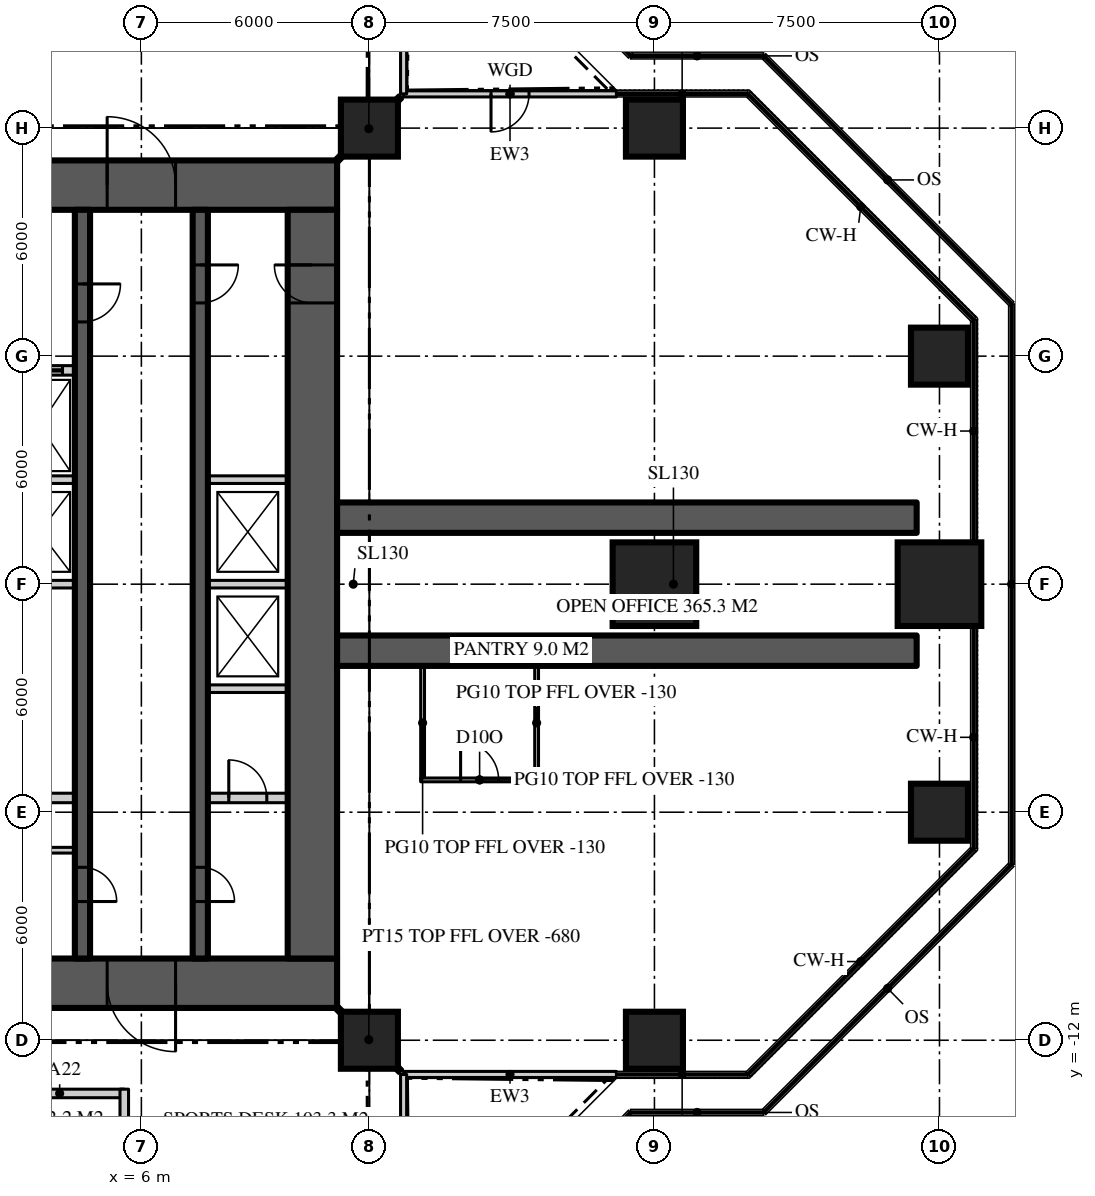
"""IFC4 building model, lengths in metres.
Left out: names, types, materials, properties, quantities, classifications, styles, units other than length and angle.
Written with IfcOpenShell. Run it as: python <this file> out.ifc"""

import sys

from ifc_helpers import new_model, si_unit, direction, frame, frame_2d, origin, origin_2d, place, context, subcontext, project, spatial, rectangle, extrude, element, fill, save


model = new_model("IFC4")
c1 = context("Model", 3, precision=1e-05, world=origin(), true_north=direction((0.0, 1.0)))
c2 = subcontext(c1, "Body", "Model", "MODEL_VIEW")
j1 = project(units=[si_unit("LENGTHUNIT", "METRE"), si_unit("PLANEANGLEUNIT", "RADIAN")], contexts=[c1])
p1 = place(None, origin())
s1 = spatial("IfcSite", under=j1, at=p1, CompositionType="ELEMENT")
p2 = place(p1, origin())
s2 = spatial("IfcBuilding", under=s1, at=p2, CompositionType="ELEMENT")
p3 = place(p2, frame((0.0, 0.0, 224.4)))
s3 = spatial("IfcBuildingStorey", under=s2, at=p3, CompositionType="ELEMENT", Elevation=224.4)
p4 = place(p3, frame((-11.15, 10.5, 0.0), z_axis=(0.0, 0.0, 1.0), x_axis=(1.0, 0.0, 0.0)))
e1 = element("IfcWall", 1, at=p4, inside=s3, PredefinedType="SHEAR", context=c2, shape_type="SweptSolid", body=[
    extrude(rectangle(XDim=22.3, YDim=1.3, at=frame_2d((11.15, 0.0))), origin(), (0.0, 0.0, 1.0), 3.9),
])
p5 = place(p4, frame((4.25, 0.0, 0.0)))
e2 = element("IfcOpeningElement", 2, at=p5, cuts=e1, PredefinedType="OPENING", context=c2, shape_type="SweptSolid", body=[
    extrude(rectangle(XDim=1.8, YDim=2.2, at=frame_2d((0.9, 1.1))), frame((0.0, 0.66, 0.0), z_axis=(0.0, -1.0, 0.0), x_axis=(1.0, 0.0, 0.0)), (0.0, 0.0, 1.0), 1.32),
])
p6 = place(p4, frame((16.25, 0.0, 0.0)))
e3 = element("IfcOpeningElement", 3, at=p6, cuts=e1, PredefinedType="OPENING", context=c2, shape_type="SweptSolid", body=[
    extrude(rectangle(XDim=1.8, YDim=2.2, at=frame_2d((0.9, 1.1))), frame((0.0, 0.66, 0.0), z_axis=(0.0, -1.0, 0.0), x_axis=(1.0, 0.0, 0.0)), (0.0, 0.0, 1.0), 1.32),
])
p7 = place(p3, frame((11.15, -10.5, 0.0), z_axis=(0.0, 0.0, 1.0), x_axis=(-1.0, 0.0, 0.0)))
e4 = element("IfcWall", 4, at=p7, inside=s3, PredefinedType="SHEAR", context=c2, shape_type="SweptSolid", body=[
    extrude(rectangle(XDim=22.3, YDim=1.3, at=frame_2d((11.15, 0.0))), origin(), (0.0, 0.0, 1.0), 3.9),
])
p8 = place(p7, frame((16.25, 0.0, 0.0)))
e5 = element("IfcOpeningElement", 5, at=p8, cuts=e4, PredefinedType="OPENING", context=c2, shape_type="SweptSolid", body=[
    extrude(rectangle(XDim=1.8, YDim=2.2, at=frame_2d((0.9, 1.1))), frame((0.0, 0.66, 0.0), z_axis=(0.0, -1.0, 0.0), x_axis=(1.0, 0.0, 0.0)), (0.0, 0.0, 1.0), 1.32),
])
p9 = place(p7, frame((4.25, 0.0, 0.0)))
e6 = element("IfcOpeningElement", 6, at=p9, cuts=e4, PredefinedType="OPENING", context=c2, shape_type="SweptSolid", body=[
    extrude(rectangle(XDim=1.8, YDim=2.2, at=frame_2d((0.9, 1.1))), frame((0.0, 0.66, 0.0), z_axis=(0.0, -1.0, 0.0), x_axis=(1.0, 0.0, 0.0)), (0.0, 0.0, 1.0), 1.32),
])
p10 = place(p3, frame((10.5, -9.85, 0.0), z_axis=(0.0, 0.0, 1.0), x_axis=(0.0, 1.0, 0.0)))
e7 = element("IfcWall", 7, at=p10, inside=s3, PredefinedType="SHEAR", context=c2, shape_type="SweptSolid", body=[
    extrude(rectangle(XDim=19.7, YDim=1.3, at=frame_2d((9.85, 0.0))), origin(), (0.0, 0.0, 1.0), 3.9),
])
p11 = place(p10, frame((17.25, 0.0, 0.0)))
e8 = element("IfcOpeningElement", 8, at=p11, cuts=e7, PredefinedType="OPENING", context=c2, shape_type="SweptSolid", body=[
    extrude(rectangle(XDim=1.0, YDim=2.2, at=frame_2d((0.5, 1.1))), frame((0.0, 0.66, 0.0), z_axis=(0.0, -1.0, 0.0), x_axis=(1.0, 0.0, 0.0)), (0.0, 0.0, 1.0), 1.32),
])
for number, where, z_axis, x_axis in (
    (9, (11.15, -1.75, 0.0), (0.0, 0.0, 1.0), (1.0, 0.0, 0.0)),
    (10, (11.15, 1.75, 0.0), (0.0, 0.0, 1.0), (1.0, 0.0, 0.0)),
):
    element("IfcWall", number, at=place(p3, frame(where, z_axis=z_axis, x_axis=x_axis)), inside=s3, PredefinedType="SHEAR", context=c2, shape_type="SweptSolid", body=[
        extrude(rectangle(XDim=15.25, YDim=0.8, at=frame_2d((7.625, 0.0))), origin(), (0.0, 0.0, 1.0), 3.9),
    ])
for number, where, z_axis, x_axis in (
    (11, (12.0, -12.0, 0.0), (0.0, 0.0, 1.0), (1.0, 0.0, 0.0)),
    (12, (19.5, -12.0, 0.0), (0.0, 0.0, 1.0), (1.0, 0.0, 0.0)),
    (13, (27.0, -6.0, 0.0), (0.0, 0.0, 1.0), (1.0, 0.0, 0.0)),
):
    element("IfcColumn", number, at=place(p3, frame(where, z_axis=z_axis, x_axis=x_axis)), inside=s3, PredefinedType="COLUMN", context=c2, shape_type="SweptSolid", body=[
        extrude(rectangle(XDim=1.5, YDim=1.5, at=origin_2d()), origin(), (0.0, 0.0, 1.0), 3.9),
    ])
for number, where, z_axis, x_axis in (
    (14, (19.5, 0.0, 0.0), (0.0, 0.0, 1.0), (1.0, 0.0, 0.0)),
    (15, (27.0, 0.0, 0.0), (0.0, 0.0, 1.0), (1.0, 0.0, 0.0)),
):
    element("IfcColumn", number, at=place(p3, frame(where, z_axis=z_axis, x_axis=x_axis)), inside=s3, PredefinedType="COLUMN", context=c2, shape_type="SweptSolid", body=[
        extrude(rectangle(XDim=2.2, YDim=2.2, at=origin_2d()), origin(), (0.0, 0.0, 1.0), 3.9),
    ])
for number, where, z_axis, x_axis in (
    (16, (27.0, 6.0, 0.0), (0.0, 0.0, 1.0), (1.0, 0.0, 0.0)),
    (17, (12.0, 12.0, 0.0), (0.0, 0.0, 1.0), (1.0, 0.0, 0.0)),
    (18, (19.5, 12.0, 0.0), (0.0, 0.0, 1.0), (1.0, 0.0, 0.0)),
):
    element("IfcColumn", number, at=place(p3, frame(where, z_axis=z_axis, x_axis=x_axis)), inside=s3, PredefinedType="COLUMN", context=c2, shape_type="SweptSolid", body=[
        extrude(rectangle(XDim=1.5, YDim=1.5, at=origin_2d()), origin(), (0.0, 0.0, 1.0), 3.9),
    ])
p12 = place(p3, frame((12.9, -12.9, 0.0), z_axis=(0.0, 0.0, 1.0), x_axis=(1.0, 0.0, 0.0)))
e19 = element("IfcWall", 19, at=p12, inside=s3, PredefinedType="SOLIDWALL", context=c2, shape_type="SweptSolid", body=[
    extrude(rectangle(XDim=5.6, YDim=0.16, at=frame_2d((2.8, 0.0))), origin(), (0.0, 0.0, 1.0), 3.77),
])
p13 = place(p3, frame((18.5, 12.9, 0.0), z_axis=(0.0, 0.0, 1.0), x_axis=(-1.0, 0.0, 0.0)))
e20 = element("IfcWall", 20, at=p13, inside=s3, PredefinedType="SOLIDWALL", context=c2, shape_type="SweptSolid", body=[
    extrude(rectangle(XDim=5.6, YDim=0.16, at=frame_2d((2.8, 0.0))), origin(), (0.0, 0.0, 1.0), 3.77),
])
p14 = place(p13, frame((2.3, 0.0, 0.0)))
e21 = element("IfcOpeningElement", 21, at=p14, cuts=e20, PredefinedType="OPENING", context=c2, shape_type="SweptSolid", body=[
    extrude(rectangle(XDim=1.0, YDim=2.2, at=frame_2d((0.5, 1.1))), frame((0.0, 0.09, 0.0), z_axis=(0.0, -1.0, 0.0), x_axis=(1.0, 0.0, 0.0)), (0.0, 0.0, 1.0), 0.18),
])
p15 = place(p3, frame((12.9, 12.9, 0.0), z_axis=(0.0, 0.0, 1.0), x_axis=(0.0, 1.0, 0.0)))
e22 = element("IfcWall", 22, at=p15, inside=s3, PredefinedType="SOLIDWALL", context=c2, shape_type="SweptSolid", body=[
    extrude(rectangle(XDim=5.6, YDim=0.16, at=frame_2d((2.8, 0.0))), origin(), (0.0, 0.0, 1.0), 3.77),
])
p16 = place(p3, frame((12.9, -18.5, 0.0), z_axis=(0.0, 0.0, 1.0), x_axis=(0.0, 1.0, 0.0)))
e23 = element("IfcWall", 23, at=p16, inside=s3, PredefinedType="SOLIDWALL", context=c2, shape_type="SweptSolid", body=[
    extrude(rectangle(XDim=5.6, YDim=0.16, at=frame_2d((2.8, 0.0))), origin(), (0.0, 0.0, 1.0), 3.77),
])
p17 = place(p16, frame((2.3, 0.0, 0.0)))
e24 = element("IfcOpeningElement", 24, at=p17, cuts=e23, PredefinedType="OPENING", context=c2, shape_type="SweptSolid", body=[
    extrude(rectangle(XDim=1.0, YDim=2.2, at=frame_2d((0.5, 1.1))), frame((0.0, 0.09, 0.0), z_axis=(0.0, -1.0, 0.0), x_axis=(1.0, 0.0, 0.0)), (0.0, 0.0, 1.0), 0.18),
])
p18 = place(p3, frame((7.55, 9.85, 0.0), z_axis=(0.0, 0.0, 1.0), x_axis=(0.0, -1.0, 0.0)))
e25 = element("IfcWall", 25, at=p18, inside=s3, PredefinedType="SHEAR", context=c2, shape_type="SweptSolid", body=[
    extrude(rectangle(XDim=19.7, YDim=0.4, at=frame_2d((9.85, 0.0))), origin(), (0.0, 0.0, 1.0), 3.9),
])
p19 = place(p18, frame((1.45, 0.0, 0.0)))
e26 = element("IfcOpeningElement", 26, at=p19, cuts=e25, PredefinedType="OPENING", context=c2, shape_type="SweptSolid", body=[
    extrude(rectangle(XDim=1.0, YDim=2.2, at=frame_2d((0.5, 1.1))), frame((0.0, 0.21, 0.0), z_axis=(0.0, -1.0, 0.0), x_axis=(1.0, 0.0, 0.0)), (0.0, 0.0, 1.0), 0.42),
])
p20 = place(p18, frame((17.3, 0.0, 0.0)))
e27 = element("IfcOpeningElement", 27, at=p20, cuts=e25, PredefinedType="OPENING", context=c2, shape_type="SweptSolid", body=[
    extrude(rectangle(XDim=0.9, YDim=2.1, at=frame_2d((0.45, 1.05))), frame((0.0, 0.21, 0.0), z_axis=(0.0, -1.0, 0.0), x_axis=(1.0, 0.0, 0.0)), (0.0, 0.0, 1.0), 0.42),
])
p21 = place(p3, frame((4.45, 9.85, 0.0), z_axis=(0.0, 0.0, 1.0), x_axis=(0.0, -1.0, 0.0)))
e28 = element("IfcWall", 28, at=p21, inside=s3, PredefinedType="SHEAR", context=c2, shape_type="SweptSolid", body=[
    extrude(rectangle(XDim=19.7, YDim=0.4, at=frame_2d((9.85, 0.0))), origin(), (0.0, 0.0, 1.0), 3.9),
])
p22 = place(p21, frame((1.95, 0.0, 0.0)))
e29 = element("IfcOpeningElement", 29, at=p22, cuts=e28, PredefinedType="OPENING", context=c2, shape_type="SweptSolid", body=[
    extrude(rectangle(XDim=1.0, YDim=2.2, at=frame_2d((0.5, 1.1))), frame((0.0, 0.21, 0.0), z_axis=(0.0, -1.0, 0.0), x_axis=(1.0, 0.0, 0.0)), (0.0, 0.0, 1.0), 0.42),
])
p23 = place(p21, frame((17.3, 0.0, 0.0)))
e30 = element("IfcOpeningElement", 30, at=p23, cuts=e28, PredefinedType="OPENING", context=c2, shape_type="SweptSolid", body=[
    extrude(rectangle(XDim=0.9, YDim=2.1, at=frame_2d((0.45, 1.05))), frame((0.0, 0.21, 0.0), z_axis=(0.0, -1.0, 0.0), x_axis=(1.0, 0.0, 0.0)), (0.0, 0.0, 1.0), 0.42),
])
p24 = place(p3, frame((2.4, 5.625, 0.0), z_axis=(0.0, 0.0, 1.0), x_axis=(1.0, 0.0, 0.0)))
e31 = element("IfcWall", 31, at=p24, inside=s3, PredefinedType="SOLIDWALL", context=c2, shape_type="SweptSolid", body=[
    extrude(rectangle(XDim=1.85, YDim=0.25, at=frame_2d((0.925, 0.0))), origin(), (0.0, 0.0, 1.0), 3.7),
])
p25 = place(p24, frame((0.325, 0.0, 0.0)))
e32 = element("IfcOpeningElement", 32, at=p25, cuts=e31, PredefinedType="OPENING", context=c2, shape_type="SweptSolid", body=[
    extrude(rectangle(XDim=1.2, YDim=2.2, at=frame_2d((0.6, 1.1))), frame((0.0, 0.135, 0.0), z_axis=(0.0, -1.0, 0.0), x_axis=(1.0, 0.0, 0.0)), (0.0, 0.0, 1.0), 0.27),
])
p26 = place(p3, frame((2.4, -5.625, 0.0), z_axis=(0.0, 0.0, 1.0), x_axis=(1.0, 0.0, 0.0)))
e33 = element("IfcWall", 33, at=p26, inside=s3, PredefinedType="SOLIDWALL", context=c2, shape_type="SweptSolid", body=[
    extrude(rectangle(XDim=1.85, YDim=0.25, at=frame_2d((0.925, 0.0))), origin(), (0.0, 0.0, 1.0), 3.7),
])
p27 = place(p3, frame((7.75, -5.625, 0.0), z_axis=(0.0, 0.0, 1.0), x_axis=(1.0, 0.0, 0.0)))
e34 = element("IfcWall", 34, at=p27, inside=s3, PredefinedType="SOLIDWALL", context=c2, shape_type="SweptSolid", body=[
    extrude(rectangle(XDim=2.1, YDim=0.25, at=frame_2d((1.05, 0.0))), origin(), (0.0, 0.0, 1.0), 3.7),
])
p28 = place(p27, frame((0.55, 0.0, 0.0)))
e35 = element("IfcOpeningElement", 35, at=p28, cuts=e34, PredefinedType="OPENING", context=c2, shape_type="SweptSolid", body=[
    extrude(rectangle(XDim=1.0, YDim=2.2, at=frame_2d((0.5, 1.1))), frame((0.0, 0.135, 0.0), z_axis=(0.0, -1.0, 0.0), x_axis=(1.0, 0.0, 0.0)), (0.0, 0.0, 1.0), 0.27),
])
p29 = place(p3, frame((7.75, -2.75, 0.0), z_axis=(0.0, 0.0, 1.0), x_axis=(1.0, 0.0, 0.0)))
e36 = element("IfcWall", 36, at=p29, inside=s3, PredefinedType="SOLIDWALL", context=c2, shape_type="SweptSolid", body=[
    extrude(rectangle(XDim=2.1, YDim=0.2, at=frame_2d((1.05, 0.0))), origin(), (0.0, 0.0, 1.0), 3.7),
])
p30 = place(p3, frame((2.4, 0.0, 0.0), z_axis=(0.0, 0.0, 1.0), x_axis=(1.0, 0.0, 0.0)))
e37 = element("IfcWall", 37, at=p30, inside=s3, PredefinedType="SOLIDWALL", context=c2, shape_type="SweptSolid", body=[
    extrude(rectangle(XDim=1.85, YDim=0.2, at=frame_2d((0.925, 0.0))), origin(), (0.0, 0.0, 1.0), 3.7),
])
p31 = place(p3, frame((7.75, 0.0, 0.0), z_axis=(0.0, 0.0, 1.0), x_axis=(1.0, 0.0, 0.0)))
e38 = element("IfcWall", 38, at=p31, inside=s3, PredefinedType="SOLIDWALL", context=c2, shape_type="SweptSolid", body=[
    extrude(rectangle(XDim=2.1, YDim=0.2, at=frame_2d((1.05, 0.0))), origin(), (0.0, 0.0, 1.0), 3.7),
])
p32 = place(p3, frame((2.4, 2.75, 0.0), z_axis=(0.0, 0.0, 1.0), x_axis=(1.0, 0.0, 0.0)))
e39 = element("IfcWall", 39, at=p32, inside=s3, PredefinedType="SOLIDWALL", context=c2, shape_type="SweptSolid", body=[
    extrude(rectangle(XDim=1.85, YDim=0.2, at=frame_2d((0.925, 0.0))), origin(), (0.0, 0.0, 1.0), 3.7),
])
p33 = place(p3, frame((7.75, 2.75, 0.0), z_axis=(0.0, 0.0, 1.0), x_axis=(1.0, 0.0, 0.0)))
e40 = element("IfcWall", 40, at=p33, inside=s3, PredefinedType="SOLIDWALL", context=c2, shape_type="SweptSolid", body=[
    extrude(rectangle(XDim=2.1, YDim=0.2, at=frame_2d((1.05, 0.0))), origin(), (0.0, 0.0, 1.0), 3.7),
])
for number, where, z_axis, x_axis in (
    (41, (13.4, -2.15, 0.0), (0.0, 0.0, 1.0), (0.0, -1.0, 0.0)),
    (42, (16.4, -2.15, 0.0), (0.0, 0.0, 1.0), (0.0, -1.0, 0.0)),
):
    element("IfcWall", number, at=place(p3, frame(where, z_axis=z_axis, x_axis=x_axis)), inside=s3, PredefinedType="PARTITIONING", context=c2, shape_type="SweptSolid", body=[
        extrude(rectangle(XDim=3.0, YDim=0.1, at=frame_2d((1.5, 0.0))), origin(), (0.0, 0.0, 1.0), 3.77),
    ])
p34 = place(p3, frame((13.35, -5.15, 0.0), z_axis=(0.0, 0.0, 1.0), x_axis=(1.0, 0.0, 0.0)))
e43 = element("IfcWall", 43, at=p34, inside=s3, PredefinedType="PARTITIONING", context=c2, shape_type="SweptSolid", body=[
    extrude(rectangle(XDim=3.1, YDim=0.1, at=frame_2d((1.55, 0.0))), origin(), (0.0, 0.0, 1.0), 3.77),
])
p35 = place(p34, frame((1.05, 0.0, 0.0)))
e44 = element("IfcOpeningElement", 44, at=p35, cuts=e43, PredefinedType="OPENING", context=c2, shape_type="SweptSolid", body=[
    extrude(rectangle(XDim=1.0, YDim=2.2, at=frame_2d((0.5, 1.1))), frame((0.0, 0.06, 0.0), z_axis=(0.0, -1.0, 0.0), x_axis=(1.0, 0.0, 0.0)), (0.0, 0.0, 1.0), 0.12),
])
p36 = place(p3, frame((2.15, -13.4, 0.0), z_axis=(0.0, 0.0, 1.0), x_axis=(1.0, 0.0, 0.0)))
e45 = element("IfcWall", 45, at=p36, inside=s3, PredefinedType="PARTITIONING", context=c2, shape_type="SweptSolid", body=[
    extrude(rectangle(XDim=3.4, YDim=0.225, at=frame_2d((1.7, 0.0))), origin(), (0.0, 0.0, 1.0), 3.77),
])
p37 = place(p3, frame((5.55, -13.288, 0.0), z_axis=(0.0, 0.0, 1.0), x_axis=(0.0, -1.0, 0.0)))
e46 = element("IfcWall", 46, at=p37, inside=s3, PredefinedType="PARTITIONING", context=c2, shape_type="SweptSolid", body=[
    extrude(rectangle(XDim=3.825, YDim=0.225, at=frame_2d((1.913, 0.0))), origin(), (0.0, 0.0, 1.0), 3.77),
])
p38 = place(p37, frame((1.312, 0.0, 0.0)))
e47 = element("IfcOpeningElement", 47, at=p38, cuts=e46, PredefinedType="OPENING", context=c2, shape_type="SweptSolid", body=[
    extrude(rectangle(XDim=1.2, YDim=2.2, at=frame_2d((0.6, 1.1))), frame((0.0, 0.123, 0.0), z_axis=(0.0, -1.0, 0.0), x_axis=(1.0, 0.0, 0.0)), (0.0, 0.0, 1.0), 0.245),
])
for number, where, z_axis, x_axis in (
    (48, (11.15, 11.15, 0.0), (0.0, 0.0, 1.0), (0.707, 0.707, 0.0)),
    (49, (11.15, -11.15, 0.0), (0.0, 0.0, 1.0), (0.707, -0.707, 0.0)),
):
    element("IfcWall", number, at=place(p3, frame(where, z_axis=z_axis, x_axis=x_axis)), inside=s3, PredefinedType="PARTITIONING", context=c2, shape_type="SweptSolid", body=[
        extrude(rectangle(XDim=2.362, YDim=0.15, at=frame_2d((1.181, 0.0))), origin(), (0.0, 0.0, 1.0), 3.22),
    ])
p39 = place(p3, frame((2.4, -7.0, 0.0), z_axis=(0.0, 0.0, 1.0), x_axis=(1.0, 0.0, 0.0)))
e50 = element("IfcWall", 50, at=p39, inside=s3, PredefinedType="SOLIDWALL", context=c2, shape_type="SweptSolid", body=[
    extrude(rectangle(XDim=1.85, YDim=0.15, at=frame_2d((0.925, 0.0))), origin(), (0.0, 0.0, 1.0), 3.77),
])
p40 = place(p39, frame((0.1, 0.0, 0.0)))
e51 = element("IfcOpeningElement", 51, at=p40, cuts=e50, PredefinedType="OPENING", context=c2, shape_type="SweptSolid", body=[
    extrude(rectangle(XDim=0.9, YDim=2.1, at=frame_2d((0.45, 1.05))), frame((0.0, 0.085, 0.0), z_axis=(0.0, -1.0, 0.0), x_axis=(1.0, 0.0, 0.0)), (0.0, 0.0, 1.0), 0.17),
])
p41 = place(p14, origin())
e52 = element("IfcDoor", 52, at=p41, inside=s3, OperationType="SINGLE_SWING_RIGHT", PredefinedType="DOOR", context=c2, shape_type="SweptSolid", body=[
    extrude(rectangle(XDim=1.0, YDim=2.2, at=frame_2d((0.5, 1.1))), frame((0.0, 0.025, 0.0), z_axis=(0.0, -1.0, 0.0), x_axis=(1.0, 0.0, 0.0)), (0.0, 0.0, 1.0), 0.05),
])
fill(e21, e52)
p42 = place(p6, origin())
e53 = element("IfcDoor", 53, at=p42, inside=s3, OperationType="DOUBLE_DOOR_DOUBLE_SWING", PredefinedType="DOOR", context=c2, shape_type="SweptSolid", body=[
    extrude(rectangle(XDim=1.8, YDim=2.2, at=frame_2d((0.9, 1.1))), frame((0.0, 0.025, 0.0), z_axis=(0.0, -1.0, 0.0), x_axis=(1.0, 0.0, 0.0)), (0.0, 0.0, 1.0), 0.05),
])
fill(e3, e53)
p43 = place(p9, origin())
e54 = element("IfcDoor", 54, at=p43, inside=s3, OperationType="DOUBLE_DOOR_DOUBLE_SWING", PredefinedType="DOOR", context=c2, shape_type="SweptSolid", body=[
    extrude(rectangle(XDim=1.8, YDim=2.2, at=frame_2d((0.9, 1.1))), frame((0.0, 0.025, 0.0), z_axis=(0.0, -1.0, 0.0), x_axis=(1.0, 0.0, 0.0)), (0.0, 0.0, 1.0), 0.05),
])
fill(e6, e54)
p44 = place(p19, origin())
e55 = element("IfcDoor", 55, at=p44, inside=s3, OperationType="SINGLE_SWING_LEFT", PredefinedType="DOOR", context=c2, shape_type="SweptSolid", body=[
    extrude(rectangle(XDim=1.0, YDim=2.2, at=frame_2d((0.5, 1.1))), frame((0.0, 0.025, 0.0), z_axis=(0.0, -1.0, 0.0), x_axis=(1.0, 0.0, 0.0)), (0.0, 0.0, 1.0), 0.05),
])
fill(e26, e55)
p45 = place(p11, origin())
e56 = element("IfcDoor", 56, at=p45, inside=s3, OperationType="SINGLE_SWING_RIGHT", PredefinedType="DOOR", context=c2, shape_type="SweptSolid", body=[
    extrude(rectangle(XDim=1.0, YDim=2.2, at=frame_2d((0.5, 1.1))), frame((0.0, 0.025, 0.0), z_axis=(0.0, -1.0, 0.0), x_axis=(1.0, 0.0, 0.0)), (0.0, 0.0, 1.0), 0.05),
])
fill(e8, e56)
p46 = place(p22, origin())
e57 = element("IfcDoor", 57, at=p46, inside=s3, OperationType="SINGLE_SWING_LEFT", PredefinedType="DOOR", context=c2, shape_type="SweptSolid", body=[
    extrude(rectangle(XDim=1.0, YDim=2.2, at=frame_2d((0.5, 1.1))), frame((0.0, 0.025, 0.0), z_axis=(0.0, -1.0, 0.0), x_axis=(1.0, 0.0, 0.0)), (0.0, 0.0, 1.0), 0.05),
])
fill(e29, e57)
p47 = place(p20, origin())
e58 = element("IfcDoor", 58, at=p47, inside=s3, OperationType="SINGLE_SWING_RIGHT", PredefinedType="DOOR", context=c2, shape_type="SweptSolid", body=[
    extrude(rectangle(XDim=0.9, YDim=2.1, at=frame_2d((0.45, 1.05))), frame((0.0, 0.025, 0.0), z_axis=(0.0, -1.0, 0.0), x_axis=(1.0, 0.0, 0.0)), (0.0, 0.0, 1.0), 0.05),
])
fill(e27, e58)
p48 = place(p23, origin())
e59 = element("IfcDoor", 59, at=p48, inside=s3, OperationType="SINGLE_SWING_RIGHT", PredefinedType="DOOR", context=c2, shape_type="SweptSolid", body=[
    extrude(rectangle(XDim=0.9, YDim=2.1, at=frame_2d((0.45, 1.05))), frame((0.0, 0.025, 0.0), z_axis=(0.0, -1.0, 0.0), x_axis=(1.0, 0.0, 0.0)), (0.0, 0.0, 1.0), 0.05),
])
fill(e30, e59)
p49 = place(p25, origin())
e60 = element("IfcDoor", 60, at=p49, inside=s3, OperationType="SLIDING_TO_LEFT", PredefinedType="DOOR", context=c2, shape_type="SweptSolid", body=[
    extrude(rectangle(XDim=1.2, YDim=2.2, at=frame_2d((0.6, 1.1))), frame((0.0, 0.025, 0.0), z_axis=(0.0, -1.0, 0.0), x_axis=(1.0, 0.0, 0.0)), (0.0, 0.0, 1.0), 0.05),
])
fill(e32, e60)
p50 = place(p35, origin())
e61 = element("IfcDoor", 61, at=p50, inside=s3, OperationType="SINGLE_SWING_LEFT", PredefinedType="DOOR", context=c2, shape_type="SweptSolid", body=[
    extrude(rectangle(XDim=1.0, YDim=2.2, at=frame_2d((0.5, 1.1))), frame((0.0, 0.025, 0.0), z_axis=(0.0, -1.0, 0.0), x_axis=(1.0, 0.0, 0.0)), (0.0, 0.0, 1.0), 0.05),
])
fill(e44, e61)
p51 = place(p28, origin())
e62 = element("IfcDoor", 62, at=p51, inside=s3, OperationType="SINGLE_SWING_LEFT", PredefinedType="DOOR", context=c2, shape_type="SweptSolid", body=[
    extrude(rectangle(XDim=1.0, YDim=2.2, at=frame_2d((0.5, 1.1))), frame((0.0, 0.025, 0.0), z_axis=(0.0, -1.0, 0.0), x_axis=(1.0, 0.0, 0.0)), (0.0, 0.0, 1.0), 0.05),
])
fill(e35, e62)
save(model, sys.argv[1])
